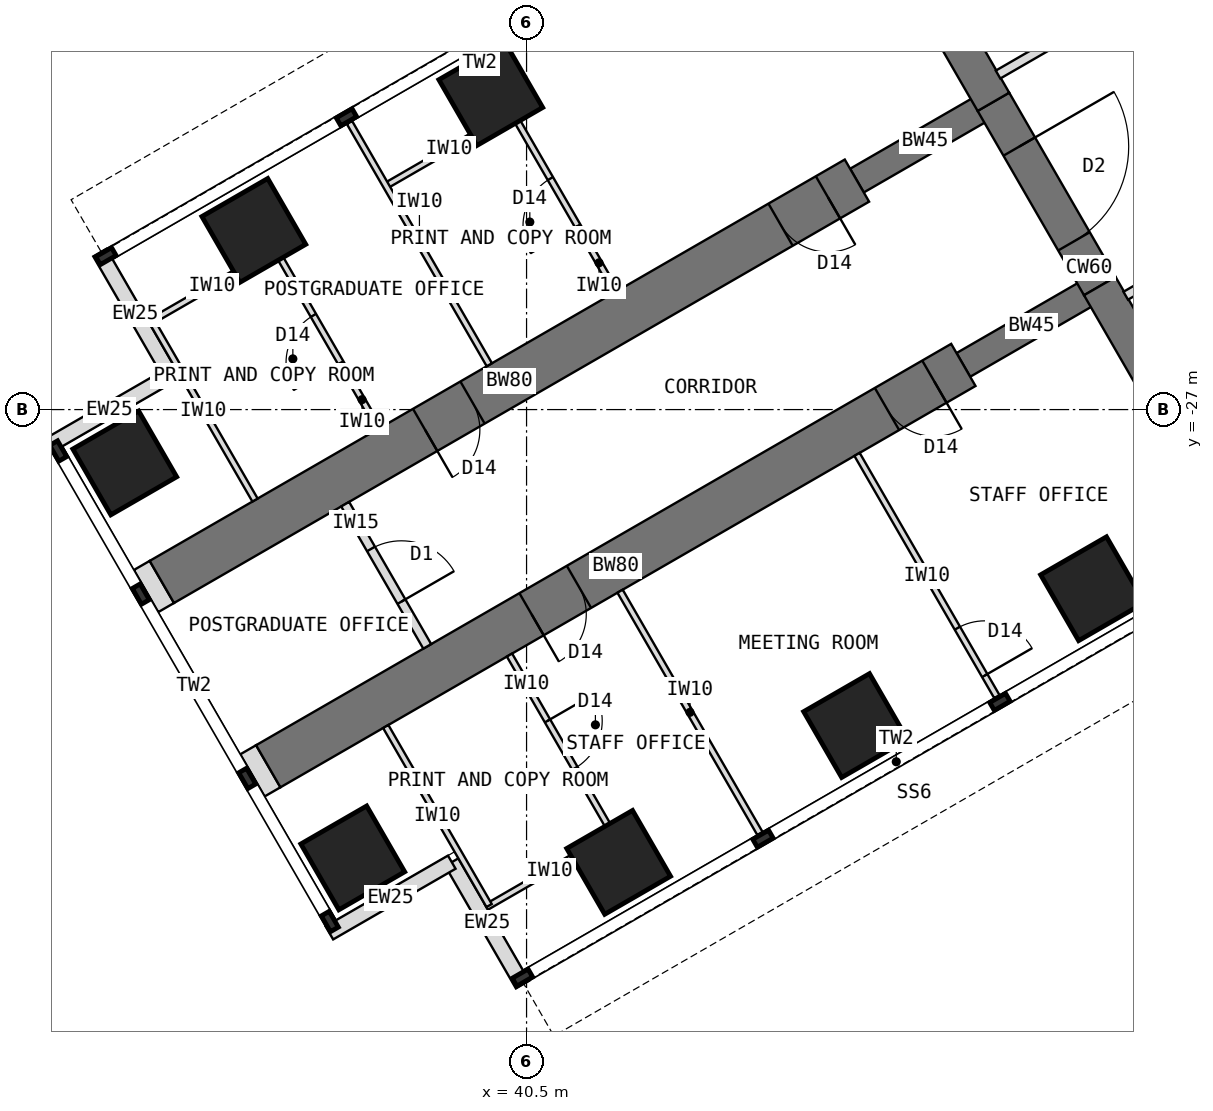
"""IFC4 building model, lengths in metres.
Left out: names, types, materials, properties, quantities, classifications, styles, units other than length and angle.
Written with IfcOpenShell. Run it as: python <this file> out.ifc"""

import sys

from ifc_helpers import new_model, si_unit, direction, frame, frame_2d, origin, origin_2d, place, context, subcontext, project, spatial, rectangle, extrude, element, fill, save


model = new_model("IFC4")
c1 = context("Model", 3, precision=1e-05, world=origin(), true_north=direction((0.0, 1.0)))
c2 = subcontext(c1, "Body", "Model", "MODEL_VIEW")
j1 = project(units=[si_unit("LENGTHUNIT", "METRE"), si_unit("PLANEANGLEUNIT", "RADIAN")], contexts=[c1])
p1 = place(None, origin())
s1 = spatial("IfcSite", under=j1, at=p1, CompositionType="ELEMENT")
p2 = place(p1, origin())
s2 = spatial("IfcBuilding", under=s1, at=p2, CompositionType="ELEMENT")
p3 = place(p2, frame((0.0, 0.0, 161.5)))
s3 = spatial("IfcBuildingStorey", under=s2, at=p3, CompositionType="ELEMENT", Elevation=161.5)
p4 = place(p3, frame((45.904, -18.0, 0.0), z_axis=(0.0, 0.0, 1.0), x_axis=(0.500024481964, -0.866011268655, 0.0)))
e1 = element("IfcWall", 1, at=p4, inside=s3, PredefinedType="SHEAR", context=c2, shape_type="SweptSolid", body=[
    extrude(rectangle(XDim=4.548, YDim=0.6, at=frame_2d((2.274, 0.0))), origin(), (0.0, 0.0, 1.0), 4.0),
])
p5 = place(p3, frame((48.178, -21.939, 0.0), z_axis=(0.0, 0.0, 1.0), x_axis=(0.500010275428, -0.866019471182, 0.0)))
e2 = element("IfcWall", 2, at=p5, inside=s3, PredefinedType="SHEAR", context=c2, shape_type="SweptSolid", body=[
    extrude(rectangle(XDim=3.5, YDim=0.6, at=frame_2d((1.75, 0.0))), origin(), (0.0, 0.0, 1.0), 4.0),
])
p6 = place(p5, frame((0.85, 0.0, 0.0)))
e3 = element("IfcOpeningElement", 3, at=p6, cuts=e2, PredefinedType="OPENING", context=c2, shape_type="SweptSolid", body=[
    extrude(rectangle(XDim=1.8, YDim=2.1, at=frame_2d((0.9, 1.05))), frame((0.0, 0.31, 0.0), z_axis=(0.0, -1.0, 0.0), x_axis=(1.0, 0.0, 0.0)), (0.0, 0.0, 1.0), 0.62),
])
p7 = place(p3, frame((49.928, -24.97, 0.0), z_axis=(0.0, 0.0, 1.0), x_axis=(0.499984222037, -0.866034513004, 0.0)))
e4 = element("IfcWall", 4, at=p7, inside=s3, PredefinedType="SHEAR", context=c2, shape_type="SweptSolid", body=[
    extrude(rectangle(XDim=4.548, YDim=0.6, at=frame_2d((2.274, 0.0))), origin(), (0.0, 0.0, 1.0), 4.0),
])
p8 = place(p3, frame((49.928, -24.97, 0.0), z_axis=(0.0, 0.0, 1.0), x_axis=(-0.866031863473, -0.499988811324, 0.0)))
e5 = element("IfcWall", 5, at=p8, inside=s3, PredefinedType="SHEAR", context=c2, shape_type="SweptSolid", body=[
    extrude(rectangle(XDim=2.592, YDim=0.45, at=frame_2d((1.296, 0.0))), origin(), (0.0, 0.0, 1.0), 4.0),
])
p9 = place(p3, frame((47.684, -26.266, 0.0), z_axis=(0.0, 0.0, 1.0), x_axis=(-0.866027579429, -0.499996231654, 0.0)))
e6 = element("IfcWall", 6, at=p9, inside=s3, PredefinedType="SHEAR", context=c2, shape_type="SweptSolid", body=[
    extrude(rectangle(XDim=13.2, YDim=0.8, at=frame_2d((6.6, 0.0))), origin(), (0.0, 0.0, 1.0), 4.0),
])
p10 = place(p9, frame((0.55, 0.0, 0.0)))
e7 = element("IfcOpeningElement", 7, at=p10, cuts=e6, PredefinedType="OPENING", context=c2, shape_type="SweptSolid", body=[
    extrude(rectangle(XDim=0.9, YDim=2.1, at=frame_2d((0.45, 1.05))), frame((0.0, 0.41, 0.0), z_axis=(0.0, -1.0, 0.0), x_axis=(1.0, 0.0, 0.0)), (0.0, 0.0, 1.0), 0.82),
])
p11 = place(p9, frame((7.3, 0.0, 0.0)))
e8 = element("IfcOpeningElement", 8, at=p11, cuts=e6, PredefinedType="OPENING", context=c2, shape_type="SweptSolid", body=[
    extrude(rectangle(XDim=0.9, YDim=2.1, at=frame_2d((0.45, 1.05))), frame((0.0, 0.41, 0.0), z_axis=(0.0, -1.0, 0.0), x_axis=(1.0, 0.0, 0.0)), (0.0, 0.0, 1.0), 0.82),
])
p12 = place(p3, frame((48.178, -21.939, 0.0), z_axis=(0.0, 0.0, 1.0), x_axis=(-0.866072649678, -0.499918158782, 0.0)))
e9 = element("IfcWall", 9, at=p12, inside=s3, PredefinedType="SHEAR", context=c2, shape_type="SweptSolid", body=[
    extrude(rectangle(XDim=2.592, YDim=0.45, at=frame_2d((1.296, 0.0))), origin(), (0.0, 0.0, 1.0), 4.0),
])
p13 = place(p3, frame((45.934, -23.234, 0.0), z_axis=(0.0, 0.0, 1.0), x_axis=(-0.866019570528, -0.500010103361, 0.0)))
e10 = element("IfcWall", 10, at=p13, inside=s3, PredefinedType="SHEAR", context=c2, shape_type="SweptSolid", body=[
    extrude(rectangle(XDim=13.2, YDim=0.8, at=frame_2d((6.6, 0.0))), origin(), (0.0, 0.0, 1.0), 4.0),
])
p14 = place(p13, frame((0.55, 0.0, 0.0)))
e11 = element("IfcOpeningElement", 11, at=p14, cuts=e10, PredefinedType="OPENING", context=c2, shape_type="SweptSolid", body=[
    extrude(rectangle(XDim=0.9, YDim=2.1, at=frame_2d((0.45, 1.05))), frame((0.0, 0.41, 0.0), z_axis=(0.0, -1.0, 0.0), x_axis=(1.0, 0.0, 0.0)), (0.0, 0.0, 1.0), 0.82),
])
p15 = place(p13, frame((7.3, 0.0, 0.0)))
e12 = element("IfcOpeningElement", 12, at=p15, cuts=e10, PredefinedType="OPENING", context=c2, shape_type="SweptSolid", body=[
    extrude(rectangle(XDim=0.9, YDim=2.1, at=frame_2d((0.45, 1.05))), frame((0.0, 0.41, 0.0), z_axis=(0.0, -1.0, 0.0), x_axis=(1.0, 0.0, 0.0)), (0.0, 0.0, 1.0), 0.82),
])
for number, where, z_axis, x_axis in (
    (13, (49.809, -29.946, 0.0), (0.0, 0.0, 1.0), (0.866, 0.5, 0.0)),
    (14, (45.912, -32.196, 0.0), (0.0, 0.0, 1.0), (0.866, 0.5, 0.0)),
    (15, (39.912, -21.804, 0.0), (0.0, 0.0, 1.0), (0.866, 0.5, 0.0)),
    (16, (42.014, -34.446, 0.0), (0.0, 0.0, 1.0), (0.866, 0.5, 0.0)),
    (17, (36.014, -24.054, 0.0), (0.0, 0.0, 1.0), (0.866, 0.5, 0.0)),
    (18, (37.642, -34.373, 0.0), (0.0, 0.0, 1.0), (0.866, 0.5, 0.0)),
    (19, (33.892, -27.877, 0.0), (0.0, 0.0, 1.0), (0.866, 0.5, 0.0)),
):
    element("IfcColumn", number, at=place(p3, frame(where, z_axis=z_axis, x_axis=x_axis)), inside=s3, PredefinedType="COLUMN", context=c2, shape_type="SweptSolid", body=[
        extrude(rectangle(XDim=1.25, YDim=1.25, at=origin_2d()), origin(), (0.0, 0.0, 1.0), 4.0),
    ])
for number, where, z_axis, x_axis in (
    (20, (40.433, -36.456, 0.0), (0.0, 0.0, 1.0), (-0.5, 0.866, 0.0)),
    (21, (39.27, -34.443, 0.0), (0.0, 0.0, 1.0), (-0.866, -0.5, 0.0)),
    (22, (33.483, -24.419, 0.0), (0.0, 0.0, 1.0), (0.5, -0.866, 0.0)),
    (23, (34.645, -26.432, 0.0), (0.0, 0.0, 1.0), (-0.866, -0.5, 0.0)),
):
    element("IfcWall", number, at=place(p3, frame(where, z_axis=z_axis, x_axis=x_axis)), inside=s3, PredefinedType="STANDARD", context=c2, shape_type="SweptSolid", body=[
        extrude(rectangle(XDim=2.325, YDim=0.25, at=frame_2d((1.163, 0.0))), origin(), (0.0, 0.0, 1.0), 3.7),
    ])
p16 = place(p3, frame((36.252, -32.865, 0.0), z_axis=(0.0, 0.0, 1.0), x_axis=(-0.865778900179, -0.500426713919, 0.0)))
e24 = element("IfcWall", 24, at=p16, inside=s3, PredefinedType="PARTITIONING", context=c2, shape_type="SweptSolid", body=[
    extrude(rectangle(XDim=0.3, YDim=0.8, at=frame_2d((0.15, 0.0))), origin(), (0.0, 0.0, 1.0), 3.7),
])
p17 = place(p3, frame((34.502, -29.834, 0.0), z_axis=(0.0, 0.0, 1.0), x_axis=(-0.866131372301, -0.499816412211, 0.0)))
e25 = element("IfcWall", 25, at=p17, inside=s3, PredefinedType="PARTITIONING", context=c2, shape_type="SweptSolid", body=[
    extrude(rectangle(XDim=0.3, YDim=0.8, at=frame_2d((0.15, 0.0))), origin(), (0.0, 0.0, 1.0), 3.7),
])
p18 = place(p3, frame((45.935, -27.737, 0.0), z_axis=(0.0, 0.0, 1.0), x_axis=(0.500014953309, -0.866016770315, 0.0)))
e26 = element("IfcWall", 26, at=p18, inside=s3, PredefinedType="PARTITIONING", context=c2, shape_type="SweptSolid", body=[
    extrude(rectangle(XDim=4.6, YDim=0.1, at=frame_2d((2.3, 0.0))), origin(), (0.0, 0.0, 1.0), 3.7),
])
p19 = place(p18, frame((3.3, 0.0, 0.0)))
e27 = element("IfcOpeningElement", 27, at=p19, cuts=e26, PredefinedType="OPENING", context=c2, shape_type="SweptSolid", body=[
    extrude(rectangle(XDim=0.9, YDim=2.1, at=frame_2d((0.45, 1.05))), frame((0.0, 0.06, 0.0), z_axis=(0.0, -1.0, 0.0), x_axis=(1.0, 0.0, 0.0)), (0.0, 0.0, 1.0), 0.12),
])
p20 = place(p3, frame((42.038, -29.987, 0.0), z_axis=(0.0, 0.0, 1.0), x_axis=(0.499975146636, -0.866039752405, 0.0)))
e28 = element("IfcWall", 28, at=p20, inside=s3, PredefinedType="PARTITIONING", context=c2, shape_type="SweptSolid", body=[
    extrude(rectangle(XDim=4.6, YDim=0.1, at=frame_2d((2.3, 0.0))), origin(), (0.0, 0.0, 1.0), 3.7),
])
p21 = place(p3, frame((41.919, -33.981, 0.0), z_axis=(0.0, 0.0, 1.0), x_axis=(-0.866050077142, -0.499957262057, 0.0)))
e29 = element("IfcWall", 29, at=p21, inside=s3, PredefinedType="PARTITIONING", context=c2, shape_type="SweptSolid", body=[
    extrude(rectangle(XDim=2.4, YDim=0.1, at=frame_2d((1.2, 0.0))), origin(), (0.0, 0.0, 1.0), 3.7),
])
p22 = place(p3, frame((40.219, -31.037, 0.0), z_axis=(0.0, 0.0, 1.0), x_axis=(0.500031147688, -0.866007419912, 0.0)))
e30 = element("IfcWall", 30, at=p22, inside=s3, PredefinedType="PARTITIONING", context=c2, shape_type="SweptSolid", body=[
    extrude(rectangle(XDim=3.4, YDim=0.1, at=frame_2d((1.7, 0.0))), origin(), (0.0, 0.0, 1.0), 3.7),
])
p23 = place(p22, frame((1.25, 0.0, 0.0)))
e31 = element("IfcOpeningElement", 31, at=p23, cuts=e30, PredefinedType="OPENING", context=c2, shape_type="SweptSolid", body=[
    extrude(rectangle(XDim=0.9, YDim=2.1, at=frame_2d((0.45, 1.05))), frame((0.0, 0.06, 0.0), z_axis=(0.0, -1.0, 0.0), x_axis=(1.0, 0.0, 0.0)), (0.0, 0.0, 1.0), 0.12),
])
p24 = place(p3, frame((38.184, -32.212, 0.0), z_axis=(0.0, 0.0, 1.0), x_axis=(0.500031147688, -0.866007419912, 0.0)))
e32 = element("IfcWall", 32, at=p24, inside=s3, PredefinedType="PARTITIONING", context=c2, shape_type="SweptSolid", body=[
    extrude(rectangle(XDim=3.4, YDim=0.1, at=frame_2d((1.7, 0.0))), origin(), (0.0, 0.0, 1.0), 3.7),
])
p25 = place(p3, frame((39.888, -26.263, 0.0), z_axis=(0.0, 0.0, 1.0), x_axis=(-0.500014953309, 0.866016770315, 0.0)))
e33 = element("IfcWall", 33, at=p25, inside=s3, PredefinedType="PARTITIONING", context=c2, shape_type="SweptSolid", body=[
    extrude(rectangle(XDim=4.6, YDim=0.1, at=frame_2d((2.3, 0.0))), origin(), (0.0, 0.0, 1.0), 3.7),
])
p26 = place(p3, frame((40.266, -22.119, 0.0), z_axis=(0.0, 0.0, 1.0), x_axis=(-0.866024647952, -0.500001309137, 0.0)))
e34 = element("IfcWall", 34, at=p26, inside=s3, PredefinedType="PARTITIONING", context=c2, shape_type="SweptSolid", body=[
    extrude(rectangle(XDim=2.4, YDim=0.1, at=frame_2d((1.2, 0.0))), origin(), (0.0, 0.0, 1.0), 3.7),
])
p27 = place(p3, frame((41.967, -25.063, 0.0), z_axis=(0.0, 0.0, 1.0), x_axis=(-0.500062241894, 0.865989465428, 0.0)))
e35 = element("IfcWall", 35, at=p27, inside=s3, PredefinedType="PARTITIONING", context=c2, shape_type="SweptSolid", body=[
    extrude(rectangle(XDim=3.4, YDim=0.1, at=frame_2d((1.7, 0.0))), origin(), (0.0, 0.0, 1.0), 3.7),
])
p28 = place(p27, frame((1.25, 0.0, 0.0)))
e36 = element("IfcOpeningElement", 36, at=p28, cuts=e35, PredefinedType="OPENING", context=c2, shape_type="SweptSolid", body=[
    extrude(rectangle(XDim=0.9, YDim=2.1, at=frame_2d((0.45, 1.05))), frame((0.0, 0.06, 0.0), z_axis=(0.0, -1.0, 0.0), x_axis=(1.0, 0.0, 0.0)), (0.0, 0.0, 1.0), 0.12),
])
p29 = place(p3, frame((36.369, -24.369, 0.0), z_axis=(0.0, 0.0, 1.0), x_axis=(-0.866050077142, -0.499957262057, 0.0)))
e37 = element("IfcWall", 37, at=p29, inside=s3, PredefinedType="PARTITIONING", context=c2, shape_type="SweptSolid", body=[
    extrude(rectangle(XDim=2.4, YDim=0.1, at=frame_2d((1.2, 0.0))), origin(), (0.0, 0.0, 1.0), 3.7),
])
p30 = place(p3, frame((38.069, -27.313, 0.0), z_axis=(0.0, 0.0, 1.0), x_axis=(-0.500008388397, 0.866020560687, 0.0)))
e38 = element("IfcWall", 38, at=p30, inside=s3, PredefinedType="PARTITIONING", context=c2, shape_type="SweptSolid", body=[
    extrude(rectangle(XDim=3.4, YDim=0.1, at=frame_2d((1.7, 0.0))), origin(), (0.0, 0.0, 1.0), 3.7),
])
p31 = place(p30, frame((1.25, 0.0, 0.0)))
e39 = element("IfcOpeningElement", 39, at=p31, cuts=e38, PredefinedType="OPENING", context=c2, shape_type="SweptSolid", body=[
    extrude(rectangle(XDim=0.9, YDim=2.1, at=frame_2d((0.45, 1.05))), frame((0.0, 0.06, 0.0), z_axis=(0.0, -1.0, 0.0), x_axis=(1.0, 0.0, 0.0)), (0.0, 0.0, 1.0), 0.12),
])
p32 = place(p3, frame((36.034, -28.488, 0.0), z_axis=(0.0, 0.0, 1.0), x_axis=(-0.499977295307, 0.866038511948, 0.0)))
e40 = element("IfcWall", 40, at=p32, inside=s3, PredefinedType="PARTITIONING", context=c2, shape_type="SweptSolid", body=[
    extrude(rectangle(XDim=3.4, YDim=0.1, at=frame_2d((1.7, 0.0))), origin(), (0.0, 0.0, 1.0), 3.7),
])
p33 = place(p3, frame((48.254, -21.49, 0.0), z_axis=(0.0, 0.0, 1.0), x_axis=(0.866025707867, 0.499999473313, 0.0)))
e41 = element("IfcWall", 41, at=p33, inside=s3, PredefinedType="PARTITIONING", context=c2, shape_type="SweptSolid", body=[
    extrude(rectangle(XDim=4.476, YDim=0.15, at=frame_2d((2.238, 0.0))), origin(), (0.0, 0.0, 1.0), 3.7),
])
p34 = place(p33, frame((2.633, 0.0, 0.0)))
e42 = element("IfcOpeningElement", 42, at=p34, cuts=e41, PredefinedType="OPENING", context=c2, shape_type="SweptSolid", body=[
    extrude(rectangle(XDim=1.0, YDim=2.1, at=frame_2d((0.5, 1.05))), frame((0.0, 0.085, 0.0), z_axis=(0.0, -1.0, 0.0), x_axis=(1.0, 0.0, 0.0)), (0.0, 0.0, 1.0), 0.17),
])
p35 = place(p3, frame((54.23, -22.89, 0.0), z_axis=(0.0, 0.0, 1.0), x_axis=(-0.866025707867, -0.499999473313, 0.0)))
e43 = element("IfcWall", 43, at=p35, inside=s3, PredefinedType="PARTITIONING", context=c2, shape_type="SweptSolid", body=[
    extrude(rectangle(XDim=4.476, YDim=0.15, at=frame_2d((2.238, 0.0))), origin(), (0.0, 0.0, 1.0), 3.7),
])
p36 = place(p35, frame((0.843, 0.0, 0.0)))
e44 = element("IfcOpeningElement", 44, at=p36, cuts=e43, PredefinedType="OPENING", context=c2, shape_type="SweptSolid", body=[
    extrude(rectangle(XDim=1.0, YDim=2.1, at=frame_2d((0.5, 1.05))), frame((0.0, 0.085, 0.0), z_axis=(0.0, -1.0, 0.0), x_axis=(1.0, 0.0, 0.0)), (0.0, 0.0, 1.0), 0.17),
])
p37 = place(p3, frame((37.517, -28.556, 0.0), z_axis=(0.0, 0.0, 1.0), x_axis=(0.500048589285, -0.86599734893, 0.0)))
e45 = element("IfcWall", 45, at=p37, inside=s3, PredefinedType="PARTITIONING", context=c2, shape_type="SweptSolid", body=[
    extrude(rectangle(XDim=2.7, YDim=0.15, at=frame_2d((1.35, 0.0))), origin(), (0.0, 0.0, 1.0), 3.7),
])
p38 = place(p37, frame((0.85, 0.0, 0.0)))
e46 = element("IfcOpeningElement", 46, at=p38, cuts=e45, PredefinedType="OPENING", context=c2, shape_type="SweptSolid", body=[
    extrude(rectangle(XDim=1.0, YDim=2.1, at=frame_2d((0.5, 1.05))), frame((0.0, 0.085, 0.0), z_axis=(0.0, -1.0, 0.0), x_axis=(1.0, 0.0, 0.0)), (0.0, 0.0, 1.0), 0.17),
])
p39 = place(p6, origin())
e47 = element("IfcDoor", 47, at=p39, inside=s3, OperationType="DOUBLE_DOOR_DOUBLE_SWING", PredefinedType="DOOR", context=c2, shape_type="SweptSolid", body=[
    extrude(rectangle(XDim=1.72, YDim=2.06, at=frame_2d((0.9, 1.03))), frame((0.0, 0.025, 0.0), z_axis=(0.0, -1.0, 0.0), x_axis=(1.0, 0.0, 0.0)), (0.0, 0.0, 1.0), 0.05),
    extrude(rectangle(XDim=0.04, YDim=2.1, at=frame_2d((0.02, 1.05))), frame((0.0, 0.3, 0.0), z_axis=(0.0, -1.0, 0.0), x_axis=(1.0, 0.0, 0.0)), (0.0, 0.0, 1.0), 0.6),
    extrude(rectangle(XDim=0.04, YDim=2.1, at=frame_2d((1.78, 1.05))), frame((0.0, 0.3, 0.0), z_axis=(0.0, -1.0, 0.0), x_axis=(1.0, 0.0, 0.0)), (0.0, 0.0, 1.0), 0.6),
    extrude(rectangle(XDim=1.72, YDim=0.04, at=frame_2d((0.9, 2.08))), frame((0.0, 0.3, 0.0), z_axis=(0.0, -1.0, 0.0), x_axis=(1.0, 0.0, 0.0)), (0.0, 0.0, 1.0), 0.6),
])
fill(e3, e47)
p40 = place(p19, origin())
e48 = element("IfcDoor", 48, at=p40, inside=s3, OperationType="SINGLE_SWING_RIGHT", PredefinedType="DOOR", context=c2, shape_type="SweptSolid", body=[
    extrude(rectangle(XDim=0.9, YDim=2.1, at=frame_2d((0.45, 1.05))), frame((0.0, 0.025, 0.0), z_axis=(0.0, -1.0, 0.0), x_axis=(1.0, 0.0, 0.0)), (0.0, 0.0, 1.0), 0.05),
])
fill(e27, e48)
p41 = place(p23, origin())
e49 = element("IfcDoor", 49, at=p41, inside=s3, OperationType="SINGLE_SWING_LEFT", PredefinedType="DOOR", context=c2, shape_type="SweptSolid", body=[
    extrude(rectangle(XDim=0.9, YDim=2.1, at=frame_2d((0.45, 1.05))), frame((0.0, 0.025, 0.0), z_axis=(0.0, -1.0, 0.0), x_axis=(1.0, 0.0, 0.0)), (0.0, 0.0, 1.0), 0.05),
])
fill(e31, e49)
p42 = place(p28, origin())
e50 = element("IfcDoor", 50, at=p42, inside=s3, OperationType="SINGLE_SWING_LEFT", PredefinedType="DOOR", context=c2, shape_type="SweptSolid", body=[
    extrude(rectangle(XDim=0.9, YDim=2.1, at=frame_2d((0.45, 1.05))), frame((0.0, 0.025, 0.0), z_axis=(0.0, -1.0, 0.0), x_axis=(1.0, 0.0, 0.0)), (0.0, 0.0, 1.0), 0.05),
])
fill(e36, e50)
p43 = place(p31, origin())
e51 = element("IfcDoor", 51, at=p43, inside=s3, OperationType="SINGLE_SWING_LEFT", PredefinedType="DOOR", context=c2, shape_type="SweptSolid", body=[
    extrude(rectangle(XDim=0.9, YDim=2.1, at=frame_2d((0.45, 1.05))), frame((0.0, 0.025, 0.0), z_axis=(0.0, -1.0, 0.0), x_axis=(1.0, 0.0, 0.0)), (0.0, 0.0, 1.0), 0.05),
])
fill(e39, e51)
p44 = place(p38, origin())
e52 = element("IfcDoor", 52, at=p44, inside=s3, OperationType="SINGLE_SWING_RIGHT", PredefinedType="DOOR", context=c2, shape_type="SweptSolid", body=[
    extrude(rectangle(XDim=1.0, YDim=2.1, at=frame_2d((0.5, 1.05))), frame((0.0, 0.025, 0.0), z_axis=(0.0, -1.0, 0.0), x_axis=(1.0, 0.0, 0.0)), (0.0, 0.0, 1.0), 0.05),
])
fill(e46, e52)
p45 = place(p10, origin())
e53 = element("IfcDoor", 53, at=p45, inside=s3, OperationType="SINGLE_SWING_LEFT", PredefinedType="DOOR", context=c2, shape_type="SweptSolid", body=[
    extrude(rectangle(XDim=0.82, YDim=2.06, at=frame_2d((0.45, 1.03))), frame((0.0, 0.025, 0.0), z_axis=(0.0, -1.0, 0.0), x_axis=(1.0, 0.0, 0.0)), (0.0, 0.0, 1.0), 0.05),
    extrude(rectangle(XDim=0.04, YDim=2.1, at=frame_2d((0.02, 1.05))), frame((0.0, 0.4, 0.0), z_axis=(0.0, -1.0, 0.0), x_axis=(1.0, 0.0, 0.0)), (0.0, 0.0, 1.0), 0.8),
    extrude(rectangle(XDim=0.04, YDim=2.1, at=frame_2d((0.88, 1.05))), frame((0.0, 0.4, 0.0), z_axis=(0.0, -1.0, 0.0), x_axis=(1.0, 0.0, 0.0)), (0.0, 0.0, 1.0), 0.8),
    extrude(rectangle(XDim=0.82, YDim=0.04, at=frame_2d((0.45, 2.08))), frame((0.0, 0.4, 0.0), z_axis=(0.0, -1.0, 0.0), x_axis=(1.0, 0.0, 0.0)), (0.0, 0.0, 1.0), 0.8),
])
fill(e7, e53)
p46 = place(p11, origin())
e54 = element("IfcDoor", 54, at=p46, inside=s3, OperationType="SINGLE_SWING_RIGHT", PredefinedType="DOOR", context=c2, shape_type="SweptSolid", body=[
    extrude(rectangle(XDim=0.82, YDim=2.06, at=frame_2d((0.45, 1.03))), frame((0.0, 0.025, 0.0), z_axis=(0.0, -1.0, 0.0), x_axis=(1.0, 0.0, 0.0)), (0.0, 0.0, 1.0), 0.05),
    extrude(rectangle(XDim=0.04, YDim=2.1, at=frame_2d((0.02, 1.05))), frame((0.0, 0.4, 0.0), z_axis=(0.0, -1.0, 0.0), x_axis=(1.0, 0.0, 0.0)), (0.0, 0.0, 1.0), 0.8),
    extrude(rectangle(XDim=0.04, YDim=2.1, at=frame_2d((0.88, 1.05))), frame((0.0, 0.4, 0.0), z_axis=(0.0, -1.0, 0.0), x_axis=(1.0, 0.0, 0.0)), (0.0, 0.0, 1.0), 0.8),
    extrude(rectangle(XDim=0.82, YDim=0.04, at=frame_2d((0.45, 2.08))), frame((0.0, 0.4, 0.0), z_axis=(0.0, -1.0, 0.0), x_axis=(1.0, 0.0, 0.0)), (0.0, 0.0, 1.0), 0.8),
])
fill(e8, e54)
p47 = place(p14, origin())
e55 = element("IfcDoor", 55, at=p47, inside=s3, OperationType="SINGLE_SWING_LEFT", PredefinedType="DOOR", context=c2, shape_type="SweptSolid", body=[
    extrude(rectangle(XDim=0.82, YDim=2.06, at=frame_2d((0.45, 1.03))), frame((0.0, 0.025, 0.0), z_axis=(0.0, -1.0, 0.0), x_axis=(1.0, 0.0, 0.0)), (0.0, 0.0, 1.0), 0.05),
    extrude(rectangle(XDim=0.04, YDim=2.1, at=frame_2d((0.02, 1.05))), frame((0.0, 0.4, 0.0), z_axis=(0.0, -1.0, 0.0), x_axis=(1.0, 0.0, 0.0)), (0.0, 0.0, 1.0), 0.8),
    extrude(rectangle(XDim=0.04, YDim=2.1, at=frame_2d((0.88, 1.05))), frame((0.0, 0.4, 0.0), z_axis=(0.0, -1.0, 0.0), x_axis=(1.0, 0.0, 0.0)), (0.0, 0.0, 1.0), 0.8),
    extrude(rectangle(XDim=0.82, YDim=0.04, at=frame_2d((0.45, 2.08))), frame((0.0, 0.4, 0.0), z_axis=(0.0, -1.0, 0.0), x_axis=(1.0, 0.0, 0.0)), (0.0, 0.0, 1.0), 0.8),
])
fill(e11, e55)
p48 = place(p15, origin())
e56 = element("IfcDoor", 56, at=p48, inside=s3, OperationType="SINGLE_SWING_RIGHT", PredefinedType="DOOR", context=c2, shape_type="SweptSolid", body=[
    extrude(rectangle(XDim=0.82, YDim=2.06, at=frame_2d((0.45, 1.03))), frame((0.0, 0.025, 0.0), z_axis=(0.0, -1.0, 0.0), x_axis=(1.0, 0.0, 0.0)), (0.0, 0.0, 1.0), 0.05),
    extrude(rectangle(XDim=0.04, YDim=2.1, at=frame_2d((0.02, 1.05))), frame((0.0, 0.4, 0.0), z_axis=(0.0, -1.0, 0.0), x_axis=(1.0, 0.0, 0.0)), (0.0, 0.0, 1.0), 0.8),
    extrude(rectangle(XDim=0.04, YDim=2.1, at=frame_2d((0.88, 1.05))), frame((0.0, 0.4, 0.0), z_axis=(0.0, -1.0, 0.0), x_axis=(1.0, 0.0, 0.0)), (0.0, 0.0, 1.0), 0.8),
    extrude(rectangle(XDim=0.82, YDim=0.04, at=frame_2d((0.45, 2.08))), frame((0.0, 0.4, 0.0), z_axis=(0.0, -1.0, 0.0), x_axis=(1.0, 0.0, 0.0)), (0.0, 0.0, 1.0), 0.8),
])
fill(e12, e56)
save(model, sys.argv[1])
